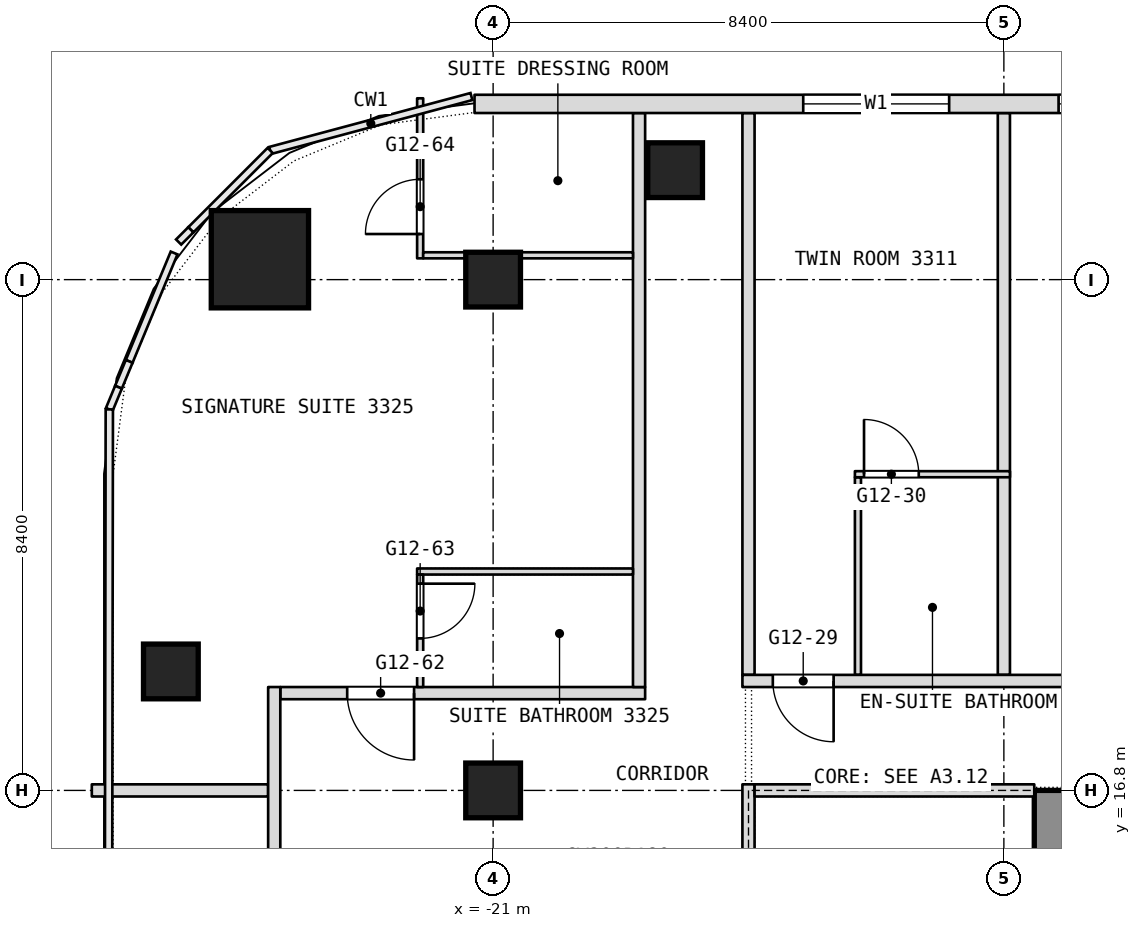
"""IFC4 building model, lengths in metres.
Left out: names, types, materials, properties, quantities, classifications, styles, units other than length and angle.
Written with IfcOpenShell. Run it as: python <this file> out.ifc"""

import sys

from ifc_helpers import new_model, si_unit, direction, frame, frame_2d, origin, origin_2d, place, context, subcontext, project, spatial, rectangle, extrude, element, fill, save


model = new_model("IFC4")
c1 = context("Model", 3, precision=1e-05, world=origin(), true_north=direction((0.0, 1.0)))
c2 = subcontext(c1, "Body", "Model", "MODEL_VIEW")
j1 = project(units=[si_unit("LENGTHUNIT", "METRE"), si_unit("PLANEANGLEUNIT", "RADIAN")], contexts=[c1])
p1 = place(None, origin())
s1 = spatial("IfcSite", under=j1, at=p1, CompositionType="ELEMENT")
p2 = place(p1, origin())
s2 = spatial("IfcBuilding", under=s1, at=p2, CompositionType="ELEMENT")
p3 = place(p2, frame((0.0, 0.0, 144.5)))
s3 = spatial("IfcBuildingStorey", under=s2, at=p3, CompositionType="ELEMENT", Elevation=144.5)
p4 = place(p3, frame((-11.6, 0.0, 0.0), z_axis=(0.0, 0.0, 1.0), x_axis=(0.0, 1.0, 0.0)))
e1 = element("IfcWall", 1, at=p4, inside=s3, PredefinedType="SHEAR", context=c2, shape_type="SweptSolid", body=[
    extrude(rectangle(XDim=16.8, YDim=1.0, at=frame_2d((8.4, 0.0))), origin(), (0.0, 0.0, 1.0), 3.6),
])
p5 = place(p4, frame((1.837, 0.0, 0.0)))
e2 = element("IfcOpeningElement", 2, at=p5, cuts=e1, PredefinedType="OPENING", context=c2, shape_type="SweptSolid", body=[
    extrude(rectangle(XDim=0.9, YDim=2.1, at=frame_2d((0.45, 1.05))), frame((0.0, 0.5, 0.0), z_axis=(0.0, -1.0, 0.0), x_axis=(1.0, 0.0, 0.0)), (0.0, 0.0, 1.0), 1.0),
])
p6 = place(p4, frame((4.462, 0.0, 0.0)))
e3 = element("IfcOpeningElement", 3, at=p6, cuts=e1, PredefinedType="OPENING", context=c2, shape_type="SweptSolid", body=[
    extrude(rectangle(XDim=0.9, YDim=2.1, at=frame_2d((0.45, 1.05))), frame((0.0, 0.5, 0.0), z_axis=(0.0, -1.0, 0.0), x_axis=(1.0, 0.0, 0.0)), (0.0, 0.0, 1.0), 1.0),
])
p7 = place(p4, frame((6.825, 0.0, 0.0)))
e4 = element("IfcOpeningElement", 4, at=p7, cuts=e1, PredefinedType="OPENING", context=c2, shape_type="SweptSolid", body=[
    extrude(rectangle(XDim=1.2, YDim=2.1, at=frame_2d((0.6, 1.05))), frame((0.0, 0.5, 0.0), z_axis=(0.0, -1.0, 0.0), x_axis=(1.0, 0.0, 0.0)), (0.0, 0.0, 1.0), 1.0),
])
p8 = place(p4, frame((12.3, 0.0, 0.0)))
e5 = element("IfcOpeningElement", 5, at=p8, cuts=e1, PredefinedType="OPENING", context=c2, shape_type="SweptSolid", body=[
    extrude(rectangle(XDim=0.9, YDim=2.1, at=frame_2d((0.45, 1.05))), frame((0.0, 0.5, 0.0), z_axis=(0.0, -1.0, 0.0), x_axis=(1.0, 0.0, 0.0)), (0.0, 0.0, 1.0), 1.0),
])
p9 = place(p4, frame((8.775, 0.0, 0.0)))
e6 = element("IfcOpeningElement", 6, at=p9, cuts=e1, PredefinedType="OPENING", context=c2, shape_type="SweptSolid", body=[
    extrude(rectangle(XDim=1.2, YDim=2.1, at=frame_2d((0.6, 1.05))), frame((0.0, 0.5, 0.0), z_axis=(0.0, -1.0, 0.0), x_axis=(1.0, 0.0, 0.0)), (0.0, 0.0, 1.0), 1.0),
])
p10 = place(p3, frame((-24.835, 25.535, 0.0), z_axis=(0.0, 0.0, 1.0), x_axis=(1.0, 0.0, 0.0)))
e7 = element("IfcColumn", 7, at=p10, inside=s3, PredefinedType="COLUMN", context=c2, shape_type="SweptSolid", body=[
    extrude(rectangle(XDim=1.6, YDim=1.6, at=origin_2d()), origin(), (0.0, 0.0, 1.0), 3.6),
])
for number, where, z_axis, x_axis in (
    (8, (-21.0, 16.8, 0.0), (0.0, 0.0, 1.0), (1.0, 0.0, 0.0)),
    (9, (-21.0, 25.2, 0.0), (0.0, 0.0, 1.0), (1.0, 0.0, 0.0)),
    (10, (-26.3, 18.756, 0.0), (0.0, 0.0, 1.0), (1.0, 0.0, 0.0)),
    (11, (-18.007, 27.0, 0.0), (0.0, 0.0, 1.0), (1.0, 0.0, 0.0)),
):
    element("IfcColumn", number, at=place(p3, frame(where, z_axis=z_axis, x_axis=x_axis)), inside=s3, PredefinedType="COLUMN", context=c2, shape_type="SweptSolid", body=[
        extrude(rectangle(XDim=0.9, YDim=0.9, at=origin_2d()), origin(), (0.0, 0.0, 1.0), 3.6),
    ])
p11 = place(p3, frame((-12.6, 18.7, 0.0), z_axis=(0.0, 0.0, 1.0), x_axis=(0.0, 1.0, 0.0)))
e12 = element("IfcWall", 12, at=p11, inside=s3, PredefinedType="PARTITIONING", context=c2, shape_type="SweptSolid", body=[
    extrude(rectangle(XDim=9.24, YDim=0.2, at=frame_2d((4.62, 0.0))), origin(), (0.0, 0.0, 1.0), 3.34),
])
p12 = place(p3, frame((-15.0, 18.7, 0.0), z_axis=(0.0, 0.0, 1.0), x_axis=(0.0, 1.0, 0.0)))
e13 = element("IfcWall", 13, at=p12, inside=s3, PredefinedType="PARTITIONING", context=c2, shape_type="SweptSolid", body=[
    extrude(rectangle(XDim=3.25, YDim=0.1, at=frame_2d((1.625, 0.0))), origin(), (0.0, 0.0, 1.0), 3.34),
])
p13 = place(p3, frame((-16.8, 18.7, 0.0), z_axis=(0.0, 0.0, 1.0), x_axis=(0.0, 1.0, 0.0)))
e14 = element("IfcWall", 14, at=p13, inside=s3, PredefinedType="PARTITIONING", context=c2, shape_type="SweptSolid", body=[
    extrude(rectangle(XDim=9.24, YDim=0.2, at=frame_2d((4.62, 0.0))), origin(), (0.0, 0.0, 1.0), 3.34),
])
p14 = place(p3, frame((-27.6, 16.8, 0.0), z_axis=(0.0, 0.0, 1.0), x_axis=(1.0, 0.0, 0.0)))
e15 = element("IfcWall", 15, at=p14, inside=s3, PredefinedType="PARTITIONING", context=c2, shape_type="SweptSolid", body=[
    extrude(rectangle(XDim=2.9, YDim=0.2, at=frame_2d((1.45, 0.0))), origin(), (0.0, 0.0, 1.0), 2.89),
])
p15 = place(p3, frame((-24.5, 18.4, 0.0), z_axis=(0.0, 0.0, 1.0), x_axis=(1.0, 0.0, 0.0)))
e16 = element("IfcWall", 16, at=p15, inside=s3, PredefinedType="PARTITIONING", context=c2, shape_type="SweptSolid", body=[
    extrude(rectangle(XDim=6.0, YDim=0.2, at=frame_2d((3.0, 0.0))), origin(), (0.0, 0.0, 1.0), 3.34),
])
p16 = place(p15, frame((1.1, 0.0, 0.0)))
e17 = element("IfcOpeningElement", 17, at=p16, cuts=e16, PredefinedType="OPENING", context=c2, shape_type="SweptSolid", body=[
    extrude(rectangle(XDim=1.1, YDim=2.1, at=frame_2d((0.55, 1.05))), frame((0.0, 0.1, 0.0), z_axis=(0.0, -1.0, 0.0), x_axis=(1.0, 0.0, 0.0)), (0.0, 0.0, 1.0), 0.2),
])
p17 = place(p3, frame((-18.6, 18.5, 0.0), z_axis=(0.0, 0.0, 1.0), x_axis=(0.0, 1.0, 0.0)))
e18 = element("IfcWall", 18, at=p17, inside=s3, PredefinedType="PARTITIONING", context=c2, shape_type="SweptSolid", body=[
    extrude(rectangle(XDim=9.44, YDim=0.2, at=frame_2d((4.72, 0.0))), origin(), (0.0, 0.0, 1.0), 3.34),
])
p18 = place(p3, frame((-16.9, 18.6, 0.0), z_axis=(0.0, 0.0, 1.0), x_axis=(1.0, 0.0, 0.0)))
e19 = element("IfcWall", 19, at=p18, inside=s3, PredefinedType="PARTITIONING", context=c2, shape_type="SweptSolid", body=[
    extrude(rectangle(XDim=18.4, YDim=0.2, at=frame_2d((9.2, 0.0))), origin(), (0.0, 0.0, 1.0), 3.34),
])
p19 = place(p18, frame((0.5, 0.0, 0.0)))
e20 = element("IfcOpeningElement", 20, at=p19, cuts=e19, PredefinedType="OPENING", context=c2, shape_type="SweptSolid", body=[
    extrude(rectangle(XDim=1.0, YDim=2.1, at=frame_2d((0.5, 1.05))), frame((0.0, 0.1, 0.0), z_axis=(0.0, -1.0, 0.0), x_axis=(1.0, 0.0, 0.0)), (0.0, 0.0, 1.0), 0.2),
])
p20 = place(p18, frame((7.6, 0.0, 0.0)))
e21 = element("IfcOpeningElement", 21, at=p20, cuts=e19, PredefinedType="OPENING", context=c2, shape_type="SweptSolid", body=[
    extrude(rectangle(XDim=1.8, YDim=2.1, at=frame_2d((0.9, 1.05))), frame((0.0, 0.1, 0.0), z_axis=(0.0, -1.0, 0.0), x_axis=(1.0, 0.0, 0.0)), (0.0, 0.0, 1.0), 0.2),
])
p21 = place(p18, frame((13.1, 0.0, 0.0)))
e22 = element("IfcOpeningElement", 22, at=p21, cuts=e19, PredefinedType="OPENING", context=c2, shape_type="SweptSolid", body=[
    extrude(rectangle(XDim=1.0, YDim=2.1, at=frame_2d((0.5, 1.05))), frame((0.0, 0.1, 0.0), z_axis=(0.0, -1.0, 0.0), x_axis=(1.0, 0.0, 0.0)), (0.0, 0.0, 1.0), 0.2),
])
p22 = place(p3, frame((-22.25, 20.4, 0.0), z_axis=(0.0, 0.0, 1.0), x_axis=(1.0, 0.0, 0.0)))
e23 = element("IfcWall", 23, at=p22, inside=s3, PredefinedType="PARTITIONING", context=c2, shape_type="SweptSolid", body=[
    extrude(rectangle(XDim=3.55, YDim=0.1, at=frame_2d((1.775, 0.0))), origin(), (0.0, 0.0, 1.0), 3.34),
])
p23 = place(p3, frame((-15.05, 22.0, 0.0), z_axis=(0.0, 0.0, 1.0), x_axis=(1.0, 0.0, 0.0)))
e24 = element("IfcWall", 24, at=p23, inside=s3, PredefinedType="PARTITIONING", context=c2, shape_type="SweptSolid", body=[
    extrude(rectangle(XDim=2.55, YDim=0.1, at=frame_2d((1.275, 0.0))), origin(), (0.0, 0.0, 1.0), 3.34),
])
p24 = place(p23, frame((0.15, 0.0, 0.0)))
e25 = element("IfcOpeningElement", 25, at=p24, cuts=e24, PredefinedType="OPENING", context=c2, shape_type="SweptSolid", body=[
    extrude(rectangle(XDim=0.9, YDim=2.1, at=frame_2d((0.45, 1.05))), frame((0.0, 0.05, 0.0), z_axis=(0.0, -1.0, 0.0), x_axis=(1.0, 0.0, 0.0)), (0.0, 0.0, 1.0), 0.1),
])
p25 = place(p3, frame((-22.2, 18.5, 0.0), z_axis=(0.0, 0.0, 1.0), x_axis=(0.0, 1.0, 0.0)))
e26 = element("IfcWall", 26, at=p25, inside=s3, PredefinedType="PARTITIONING", context=c2, shape_type="SweptSolid", body=[
    extrude(rectangle(XDim=1.85, YDim=0.1, at=frame_2d((0.925, 0.0))), origin(), (0.0, 0.0, 1.0), 3.34),
])
p26 = place(p25, frame((0.8, 0.0, 0.0)))
e27 = element("IfcOpeningElement", 27, at=p26, cuts=e26, PredefinedType="OPENING", context=c2, shape_type="SweptSolid", body=[
    extrude(rectangle(XDim=0.9, YDim=2.1, at=frame_2d((0.45, 1.05))), frame((0.0, 0.05, 0.0), z_axis=(0.0, -1.0, 0.0), x_axis=(1.0, 0.0, 0.0)), (0.0, 0.0, 1.0), 0.1),
])
p27 = place(p3, frame((-22.2, 25.55, 0.0), z_axis=(0.0, 0.0, 1.0), x_axis=(0.0, 1.0, 0.0)))
e28 = element("IfcWall", 28, at=p27, inside=s3, PredefinedType="PARTITIONING", context=c2, shape_type="SweptSolid", body=[
    extrude(rectangle(XDim=2.632, YDim=0.1, at=frame_2d((1.316, 0.0))), origin(), (0.0, 0.0, 1.0), 3.34),
])
p28 = place(p27, frame((0.4, 0.0, 0.0)))
e29 = element("IfcOpeningElement", 29, at=p28, cuts=e28, PredefinedType="OPENING", context=c2, shape_type="SweptSolid", body=[
    extrude(rectangle(XDim=0.9, YDim=2.1, at=frame_2d((0.45, 1.05))), frame((0.0, 0.05, 0.0), z_axis=(0.0, -1.0, 0.0), x_axis=(1.0, 0.0, 0.0)), (0.0, 0.0, 1.0), 0.1),
])
p29 = place(p3, frame((-24.6, 6.9, 0.0), z_axis=(0.0, 0.0, 1.0), x_axis=(0.0, 1.0, 0.0)))
e30 = element("IfcWall", 30, at=p29, inside=s3, PredefinedType="PARTITIONING", context=c2, shape_type="SweptSolid", body=[
    extrude(rectangle(XDim=11.6, YDim=0.2, at=frame_2d((5.8, 0.0))), origin(), (0.0, 0.0, 1.0), 3.34),
])
p30 = place(p29, frame((5.45, 0.0, 0.0)))
e31 = element("IfcOpeningElement", 31, at=p30, cuts=e30, PredefinedType="OPENING", context=c2, shape_type="SweptSolid", body=[
    extrude(rectangle(XDim=1.8, YDim=2.1, at=frame_2d((0.9, 1.05))), frame((0.0, 0.1, 0.0), z_axis=(0.0, -1.0, 0.0), x_axis=(1.0, 0.0, 0.0)), (0.0, 0.0, 1.0), 0.2),
])
p31 = place(p29, frame((0.3, 0.0, 0.0)))
e32 = element("IfcOpeningElement", 32, at=p31, cuts=e30, PredefinedType="OPENING", context=c2, shape_type="SweptSolid", body=[
    extrude(rectangle(XDim=1.0, YDim=2.1, at=frame_2d((0.5, 1.05))), frame((0.0, 0.1, 0.0), z_axis=(0.0, -1.0, 0.0), x_axis=(1.0, 0.0, 0.0)), (0.0, 0.0, 1.0), 0.2),
])
p32 = place(p3, frame((-22.15, 25.6, 0.0), z_axis=(0.0, 0.0, 1.0), x_axis=(1.0, 0.0, 0.0)))
e33 = element("IfcWall", 33, at=p32, inside=s3, PredefinedType="PARTITIONING", context=c2, shape_type="SweptSolid", body=[
    extrude(rectangle(XDim=3.45, YDim=0.1, at=frame_2d((1.725, 0.0))), origin(), (0.0, 0.0, 1.0), 3.34),
])
p33 = place(p3, frame((21.306, 28.09, 0.0), z_axis=(0.0, 0.0, 1.0), x_axis=(-1.0, 0.0, 0.0)))
e34 = element("IfcWall", 34, at=p33, inside=s3, PredefinedType="NOTDEFINED", context=c2, shape_type="SweptSolid", body=[
    extrude(rectangle(XDim=42.612, YDim=0.3, at=frame_2d((21.306, 0.0))), origin(), (0.0, 0.0, 1.0), 3.6),
])
p34 = place(p33, frame((5.406, 0.0, 0.9)))
e35 = element("IfcOpeningElement", 35, at=p34, cuts=e34, PredefinedType="OPENING", context=c2, shape_type="SweptSolid", body=[
    extrude(rectangle(XDim=2.4, YDim=2.1, at=frame_2d((1.2, 1.05))), frame((0.0, 0.15, 0.0), z_axis=(0.0, -1.0, 0.0), x_axis=(1.0, 0.0, 0.0)), (0.0, 0.0, 1.0), 0.3),
])
p35 = place(p33, frame((9.606, 0.0, 0.9)))
e36 = element("IfcOpeningElement", 36, at=p35, cuts=e34, PredefinedType="OPENING", context=c2, shape_type="SweptSolid", body=[
    extrude(rectangle(XDim=2.4, YDim=2.1, at=frame_2d((1.2, 1.05))), frame((0.0, 0.15, 0.0), z_axis=(0.0, -1.0, 0.0), x_axis=(1.0, 0.0, 0.0)), (0.0, 0.0, 1.0), 0.3),
])
p36 = place(p33, frame((13.806, 0.0, 0.9)))
e37 = element("IfcOpeningElement", 37, at=p36, cuts=e34, PredefinedType="OPENING", context=c2, shape_type="SweptSolid", body=[
    extrude(rectangle(XDim=2.4, YDim=2.1, at=frame_2d((1.2, 1.05))), frame((0.0, 0.15, 0.0), z_axis=(0.0, -1.0, 0.0), x_axis=(1.0, 0.0, 0.0)), (0.0, 0.0, 1.0), 0.3),
])
p37 = place(p33, frame((18.006, 0.0, 0.9)))
e38 = element("IfcOpeningElement", 38, at=p37, cuts=e34, PredefinedType="OPENING", context=c2, shape_type="SweptSolid", body=[
    extrude(rectangle(XDim=2.4, YDim=2.1, at=frame_2d((1.2, 1.05))), frame((0.0, 0.15, 0.0), z_axis=(0.0, -1.0, 0.0), x_axis=(1.0, 0.0, 0.0)), (0.0, 0.0, 1.0), 0.3),
])
p38 = place(p33, frame((22.206, 0.0, 0.9)))
e39 = element("IfcOpeningElement", 39, at=p38, cuts=e34, PredefinedType="OPENING", context=c2, shape_type="SweptSolid", body=[
    extrude(rectangle(XDim=2.4, YDim=2.1, at=frame_2d((1.2, 1.05))), frame((0.0, 0.15, 0.0), z_axis=(0.0, -1.0, 0.0), x_axis=(1.0, 0.0, 0.0)), (0.0, 0.0, 1.0), 0.3),
])
p39 = place(p33, frame((26.406, 0.0, 0.9)))
e40 = element("IfcOpeningElement", 40, at=p39, cuts=e34, PredefinedType="OPENING", context=c2, shape_type="SweptSolid", body=[
    extrude(rectangle(XDim=2.4, YDim=2.1, at=frame_2d((1.2, 1.05))), frame((0.0, 0.15, 0.0), z_axis=(0.0, -1.0, 0.0), x_axis=(1.0, 0.0, 0.0)), (0.0, 0.0, 1.0), 0.3),
])
p40 = place(p33, frame((30.606, 0.0, 0.9)))
e41 = element("IfcOpeningElement", 41, at=p40, cuts=e34, PredefinedType="OPENING", context=c2, shape_type="SweptSolid", body=[
    extrude(rectangle(XDim=2.4, YDim=2.1, at=frame_2d((1.2, 1.05))), frame((0.0, 0.15, 0.0), z_axis=(0.0, -1.0, 0.0), x_axis=(1.0, 0.0, 0.0)), (0.0, 0.0, 1.0), 0.3),
])
p41 = place(p33, frame((34.806, 0.0, 0.9)))
e42 = element("IfcOpeningElement", 42, at=p41, cuts=e34, PredefinedType="OPENING", context=c2, shape_type="SweptSolid", body=[
    extrude(rectangle(XDim=2.4, YDim=2.1, at=frame_2d((1.2, 1.05))), frame((0.0, 0.15, 0.0), z_axis=(0.0, -1.0, 0.0), x_axis=(1.0, 0.0, 0.0)), (0.0, 0.0, 1.0), 0.3),
])
p42 = place(p3, frame((-16.8, -0.1, 0.0), z_axis=(0.0, 0.0, 1.0), x_axis=(0.0, 1.0, 0.0)))
e43 = element("IfcWall", 43, at=p42, inside=s3, PredefinedType="PARTITIONING", context=c2, shape_type="SweptSolid", body=[
    extrude(rectangle(XDim=17.0, YDim=0.2, at=frame_2d((8.5, 0.0))), origin(), (0.0, 0.0, 1.0), 3.34),
])
p43 = place(p42, frame((2.2, 0.0, 0.0)))
e44 = element("IfcOpeningElement", 44, at=p43, cuts=e43, PredefinedType="OPENING", context=c2, shape_type="SweptSolid", body=[
    extrude(rectangle(XDim=1.8, YDim=2.1, at=frame_2d((0.9, 1.05))), frame((0.0, 0.1, 0.0), z_axis=(0.0, -1.0, 0.0), x_axis=(1.0, 0.0, 0.0)), (0.0, 0.0, 1.0), 0.2),
])
p44 = place(p42, frame((7.2, 0.0, 0.0)))
e45 = element("IfcOpeningElement", 45, at=p44, cuts=e43, PredefinedType="OPENING", context=c2, shape_type="SweptSolid", body=[
    extrude(rectangle(XDim=1.8, YDim=2.1, at=frame_2d((0.9, 1.05))), frame((0.0, 0.1, 0.0), z_axis=(0.0, -1.0, 0.0), x_axis=(1.0, 0.0, 0.0)), (0.0, 0.0, 1.0), 0.2),
])
p45 = place(p3, frame((-16.7, 16.8, 0.0), z_axis=(0.0, 0.0, 1.0), x_axis=(1.0, 0.0, 0.0)))
e46 = element("IfcWall", 46, at=p45, inside=s3, PredefinedType="PARTITIONING", context=c2, shape_type="SweptSolid", body=[
    extrude(rectangle(XDim=4.6, YDim=0.2, at=frame_2d((2.3, 0.0))), origin(), (0.0, 0.0, 1.0), 2.89),
])
p46 = place(p16, origin())
e47 = element("IfcDoor", 47, at=p46, inside=s3, OperationType="SINGLE_SWING_RIGHT", PredefinedType="DOOR", context=c2, shape_type="SweptSolid", body=[
    extrude(rectangle(XDim=1.1, YDim=2.1, at=frame_2d((0.55, 1.05))), frame((0.0, 0.025, 0.0), z_axis=(0.0, -1.0, 0.0), x_axis=(1.0, 0.0, 0.0)), (0.0, 0.0, 1.0), 0.05),
])
fill(e17, e47)
p47 = place(p19, origin())
e48 = element("IfcDoor", 48, at=p47, inside=s3, OperationType="SINGLE_SWING_RIGHT", PredefinedType="DOOR", context=c2, shape_type="SweptSolid", body=[
    extrude(rectangle(XDim=1.0, YDim=2.1, at=frame_2d((0.5, 1.05))), frame((0.0, 0.025, 0.0), z_axis=(0.0, -1.0, 0.0), x_axis=(1.0, 0.0, 0.0)), (0.0, 0.0, 1.0), 0.05),
])
fill(e20, e48)
p48 = place(p24, origin())
e49 = element("IfcDoor", 49, at=p48, inside=s3, OperationType="SINGLE_SWING_RIGHT", PredefinedType="DOOR", context=c2, shape_type="SweptSolid", body=[
    extrude(rectangle(XDim=0.9, YDim=2.1, at=frame_2d((0.45, 1.05))), frame((0.0, 0.025, 0.0), z_axis=(0.0, -1.0, 0.0), x_axis=(1.0, 0.0, 0.0)), (0.0, 0.0, 1.0), 0.05),
])
fill(e25, e49)
p49 = place(p26, origin())
e50 = element("IfcDoor", 50, at=p49, inside=s3, OperationType="SINGLE_SWING_LEFT", PredefinedType="DOOR", context=c2, shape_type="SweptSolid", body=[
    extrude(rectangle(XDim=0.9, YDim=2.1, at=frame_2d((0.45, 1.05))), frame((0.0, 0.025, 0.0), z_axis=(0.0, -1.0, 0.0), x_axis=(1.0, 0.0, 0.0)), (0.0, 0.0, 1.0), 0.05),
])
fill(e27, e50)
p50 = place(p28, origin())
e51 = element("IfcDoor", 51, at=p50, inside=s3, OperationType="SINGLE_SWING_RIGHT", PredefinedType="DOOR", context=c2, shape_type="SweptSolid", body=[
    extrude(rectangle(XDim=0.9, YDim=2.1, at=frame_2d((0.45, 1.05))), frame((0.0, 0.025, 0.0), z_axis=(0.0, -1.0, 0.0), x_axis=(1.0, 0.0, 0.0)), (0.0, 0.0, 1.0), 0.05),
])
fill(e29, e51)
p51 = place(p40, origin())
e52 = element("IfcWindow", 52, at=p51, inside=s3, PartitioningType="SINGLE_PANEL", PredefinedType="WINDOW", context=c2, shape_type="SweptSolid", body=[
    extrude(rectangle(XDim=2.4, YDim=2.1, at=frame_2d((1.2, 1.05))), frame((0.0, 0.03, 0.0), z_axis=(0.0, -1.0, 0.0), x_axis=(1.0, 0.0, 0.0)), (0.0, 0.0, 1.0), 0.06),
])
fill(e41, e52)
p52 = place(p41, origin())
e53 = element("IfcWindow", 53, at=p52, inside=s3, PartitioningType="SINGLE_PANEL", PredefinedType="WINDOW", context=c2, shape_type="SweptSolid", body=[
    extrude(rectangle(XDim=2.4, YDim=2.1, at=frame_2d((1.2, 1.05))), frame((0.0, 0.03, 0.0), z_axis=(0.0, -1.0, 0.0), x_axis=(1.0, 0.0, 0.0)), (0.0, 0.0, 1.0), 0.06),
])
fill(e42, e53)
save(model, sys.argv[1])
